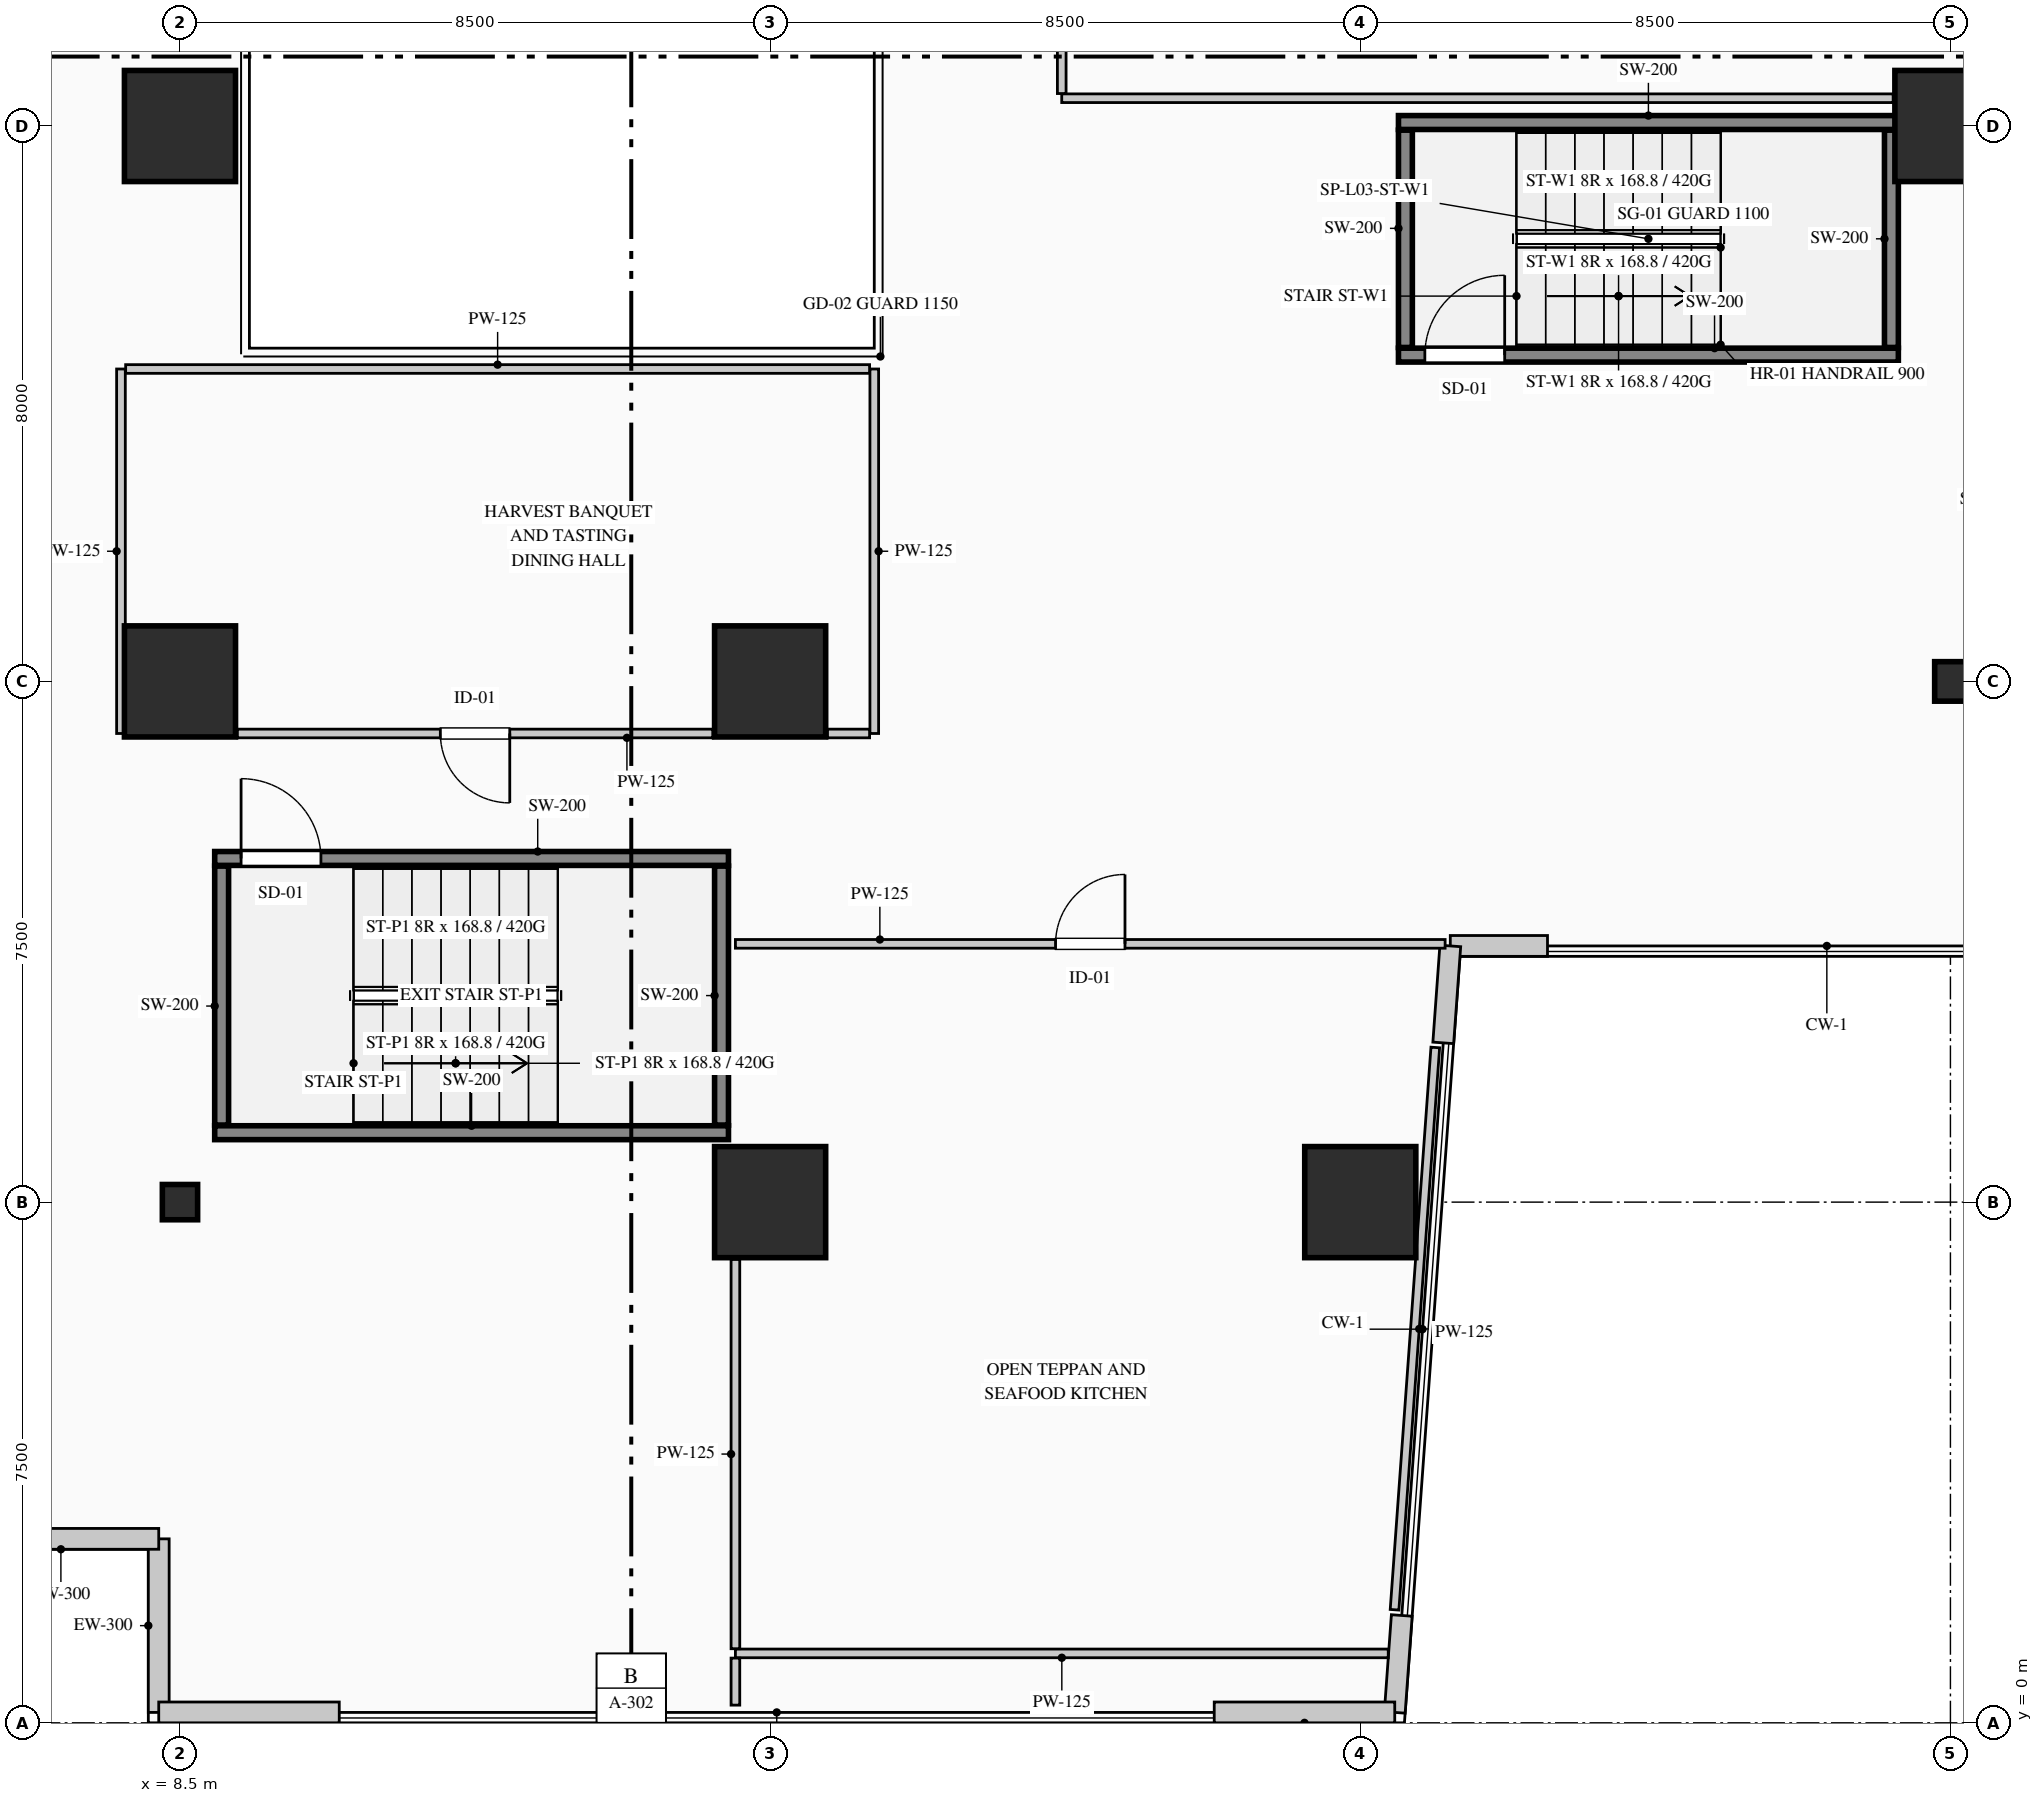
"""IFC4 building model, lengths in metres.
Left out: names, types, materials, properties, quantities, classifications, styles, units other than length and angle.
Written with IfcOpenShell. Run it as: python <this file> out.ifc"""

import sys

from ifc_helpers import new_model, si_unit, direction, frame, frame_2d, origin, origin_2d, place, context, subcontext, project, spatial, rectangle, hollow_circle, i_section, extrude, element, fill, save


model = new_model("IFC4")
c1 = context("Model", 3, precision=1e-05, world=origin(), true_north=direction((0.0, 1.0)))
c2 = subcontext(c1, "Body", "Model", "MODEL_VIEW")
j1 = project(units=[si_unit("LENGTHUNIT", "METRE"), si_unit("PLANEANGLEUNIT", "RADIAN")], contexts=[c1])
p1 = place(None, origin())
s1 = spatial("IfcSite", under=j1, at=p1, CompositionType="ELEMENT")
p2 = place(p1, origin())
s2 = spatial("IfcBuilding", under=s1, at=p2, CompositionType="ELEMENT")
p3 = place(p2, frame((0.0, 0.0, 10.8)))
s3 = spatial("IfcBuildingStorey", under=s2, at=p3, CompositionType="ELEMENT", Elevation=10.8)
p4 = place(p3, frame((26.05, 19.7, 0.0), z_axis=(0.0, 0.0, 1.0), x_axis=(1.0, 0.0, 0.0)))
e1 = element("IfcWall", 1, at=p4, inside=s3, PredefinedType="SHEAR", context=c2, shape_type="SweptSolid", body=[
    extrude(rectangle(XDim=7.2, YDim=0.2, at=frame_2d((3.6, 0.0))), origin(), (0.0, 0.0, 1.0), 5.4),
])
p5 = place(p4, frame((0.38, 0.0, 0.0)))
e2 = element("IfcOpeningElement", 2, at=p5, cuts=e1, PredefinedType="OPENING", context=c2, shape_type="SweptSolid", body=[
    extrude(rectangle(XDim=1.15, YDim=2.2, at=frame_2d((0.575, 1.1))), frame((0.0, 0.11, 0.0), z_axis=(0.0, -1.0, 0.0), x_axis=(1.0, 0.0, 0.0)), (0.0, 0.0, 1.0), 0.22),
])
p6 = place(p3, frame((26.05, 23.05, 0.0), z_axis=(0.0, 0.0, 1.0), x_axis=(1.0, 0.0, 0.0)))
e3 = element("IfcWall", 3, at=p6, inside=s3, PredefinedType="SHEAR", context=c2, shape_type="SweptSolid", body=[
    extrude(rectangle(XDim=7.2, YDim=0.2, at=frame_2d((3.6, 0.0))), origin(), (0.0, 0.0, 1.0), 5.4),
])
for number, where, z_axis, x_axis in (
    (4, (26.15, 19.81, 0.0), (0.0, 0.0, 1.0), (0.0, 1.0, 0.0)),
    (5, (33.15, 19.81, 0.0), (0.0, 0.0, 1.0), (0.0, 1.0, 0.0)),
):
    element("IfcWall", number, at=place(p3, frame(where, z_axis=z_axis, x_axis=x_axis)), inside=s3, PredefinedType="SHEAR", context=c2, shape_type="SweptSolid", body=[
        extrude(rectangle(XDim=3.13, YDim=0.2, at=frame_2d((1.565, 0.0))), origin(), (0.0, 0.0, 1.0), 5.4),
    ])
p7 = place(p3, frame((9.0, 8.5, 0.0), z_axis=(0.0, 0.0, 1.0), x_axis=(1.0, 0.0, 0.0)))
e6 = element("IfcWall", 6, at=p7, inside=s3, PredefinedType="SHEAR", context=c2, shape_type="SweptSolid", body=[
    extrude(rectangle(XDim=7.4, YDim=0.2, at=frame_2d((3.7, 0.0))), origin(), (0.0, 0.0, 1.0), 5.4),
])
p8 = place(p3, frame((9.0, 12.45, 0.0), z_axis=(0.0, 0.0, 1.0), x_axis=(1.0, 0.0, 0.0)))
e7 = element("IfcWall", 7, at=p8, inside=s3, PredefinedType="SHEAR", context=c2, shape_type="SweptSolid", body=[
    extrude(rectangle(XDim=7.4, YDim=0.2, at=frame_2d((3.7, 0.0))), origin(), (0.0, 0.0, 1.0), 5.4),
])
p9 = place(p8, frame((0.38, 0.0, 0.0)))
e8 = element("IfcOpeningElement", 8, at=p9, cuts=e7, PredefinedType="OPENING", context=c2, shape_type="SweptSolid", body=[
    extrude(rectangle(XDim=1.15, YDim=2.2, at=frame_2d((0.575, 1.1))), frame((0.0, 0.11, 0.0), z_axis=(0.0, -1.0, 0.0), x_axis=(1.0, 0.0, 0.0)), (0.0, 0.0, 1.0), 0.22),
])
for number, where, z_axis, x_axis in (
    (9, (9.1, 8.61, 0.0), (0.0, 0.0, 1.0), (0.0, 1.0, 0.0)),
    (10, (16.3, 8.61, 0.0), (0.0, 0.0, 1.0), (0.0, 1.0, 0.0)),
):
    element("IfcWall", number, at=place(p3, frame(where, z_axis=z_axis, x_axis=x_axis)), inside=s3, PredefinedType="SHEAR", context=c2, shape_type="SweptSolid", body=[
        extrude(rectangle(XDim=3.73, YDim=0.2, at=frame_2d((1.865, 0.0))), origin(), (0.0, 0.0, 1.0), 5.4),
    ])
p10 = place(p3, frame((8.5, 7.5, 0.0), z_axis=(0.0, 0.0, 1.0), x_axis=(1.0, 0.0, 0.0)))
e11 = element("IfcColumn", 11, at=p10, inside=s3, PredefinedType="COLUMN", context=c2, shape_type="SweptSolid", body=[
    extrude(hollow_circle(Radius=0.254, WallThickness=0.025, at=origin_2d()), origin(), (0.0, 0.0, 1.0), 5.4),
])
for number, where, z_axis, x_axis in (
    (12, (8.5, 15.0, 0.0), (0.0, 0.0, 1.0), (1.0, 0.0, 0.0)),
    (13, (8.5, 23.0, 0.0), (0.0, 0.0, 1.0), (1.0, 0.0, 0.0)),
    (14, (17.0, 7.5, 0.0), (0.0, 0.0, 1.0), (1.0, 0.0, 0.0)),
    (15, (17.0, 15.0, 0.0), (0.0, 0.0, 1.0), (1.0, 0.0, 0.0)),
    (16, (25.5, 7.5, 0.0), (0.0, 0.0, 1.0), (1.0, 0.0, 0.0)),
):
    element("IfcColumn", number, at=place(p3, frame(where, z_axis=z_axis, x_axis=x_axis)), inside=s3, PredefinedType="COLUMN", context=c2, shape_type="SweptSolid", body=[
        extrude(rectangle(XDim=1.6, YDim=1.6, at=origin_2d()), origin(), (0.0, 0.0, 1.0), 5.4),
    ])
p11 = place(p3, frame((34.0, 15.0, 0.0), z_axis=(0.0, 0.0, 1.0), x_axis=(1.0, 0.0, 0.0)))
e17 = element("IfcColumn", 17, at=p11, inside=s3, PredefinedType="COLUMN", context=c2, shape_type="SweptSolid", body=[
    extrude(i_section(OverallWidth=0.454, OverallDepth=0.569, WebThickness=0.078, FlangeThickness=0.08, FilletRadius=0.015, at=origin_2d()), origin(), (0.0, 0.0, 1.0), 5.4),
])
p12 = place(p3, frame((34.0, 23.0, 0.0), z_axis=(0.0, 0.0, 1.0), x_axis=(1.0, 0.0, 0.0)))
e18 = element("IfcColumn", 18, at=p12, inside=s3, PredefinedType="COLUMN", context=c2, shape_type="SweptSolid", body=[
    extrude(rectangle(XDim=1.6, YDim=1.6, at=origin_2d()), origin(), (0.0, 0.0, 1.0), 5.4),
])
p13 = place(p3, frame((8.194, 0.15, 0.0), z_axis=(0.0, 0.0, 1.0), x_axis=(0.0, 1.0, 0.0)))
e19 = element("IfcWall", 19, at=p13, inside=s3, PredefinedType="STANDARD", context=c2, shape_type="SweptSolid", body=[
    extrude(rectangle(XDim=2.5, YDim=0.3, at=frame_2d((1.25, 0.0))), origin(), (0.0, 0.0, 1.0), 5.08),
])
p14 = place(p3, frame((8.194, 2.65, 0.0), z_axis=(0.0, 0.0, 1.0), x_axis=(-1.0, 0.0, 0.0)))
e20 = element("IfcWall", 20, at=p14, inside=s3, PredefinedType="STANDARD", context=c2, shape_type="SweptSolid", body=[
    extrude(rectangle(XDim=2.818, YDim=0.3, at=frame_2d((1.409, 0.0))), origin(), (0.0, 0.0, 1.0), 5.08),
])
p15 = place(p3, frame((28.197, 11.19, 0.0), z_axis=(0.0, 0.0, 1.0), x_axis=(-1.0, 0.0, 0.0)))
e21 = element("IfcWall", 21, at=p15, inside=s3, PredefinedType="STANDARD", context=c2, shape_type="SweptSolid", body=[
    extrude(rectangle(XDim=1.4, YDim=0.3, at=frame_2d((0.7, 0.0))), origin(), (0.0, 0.0, 1.0), 5.08),
])
p16 = place(p3, frame((26.796, 11.19, 0.0), z_axis=(0.0, 0.0, 1.0), x_axis=(-0.072201344972, -0.997390077043, 0.0)))
e22 = element("IfcWall", 22, at=p16, inside=s3, PredefinedType="STANDARD", context=c2, shape_type="SweptSolid", body=[
    extrude(rectangle(XDim=1.4, YDim=0.3, at=frame_2d((0.7, 0.0))), origin(), (0.0, 0.0, 1.0), 5.08),
])
p17 = place(p3, frame((26.098, 1.546, 0.0), z_axis=(0.0, 0.0, 1.0), x_axis=(-0.072188788144, -0.997390985956, 0.0)))
e23 = element("IfcWall", 23, at=p17, inside=s3, PredefinedType="STANDARD", context=c2, shape_type="SweptSolid", body=[
    extrude(rectangle(XDim=1.4, YDim=0.3, at=frame_2d((0.7, 0.0))), origin(), (0.0, 0.0, 1.0), 5.08),
])
p18 = place(p3, frame((25.997, 0.15, 0.0), z_axis=(0.0, 0.0, 1.0), x_axis=(-1.0, 0.0, 0.0)))
e24 = element("IfcWall", 24, at=p18, inside=s3, PredefinedType="STANDARD", context=c2, shape_type="SweptSolid", body=[
    extrude(rectangle(XDim=2.6, YDim=0.3, at=frame_2d((1.3, 0.0))), origin(), (0.0, 0.0, 1.0), 5.08),
])
p19 = place(p3, frame((10.794, 0.15, 0.0), z_axis=(0.0, 0.0, 1.0), x_axis=(-1.0, 0.0, 0.0)))
e25 = element("IfcWall", 25, at=p19, inside=s3, PredefinedType="STANDARD", context=c2, shape_type="SweptSolid", body=[
    extrude(rectangle(XDim=2.6, YDim=0.3, at=frame_2d((1.3, 0.0))), origin(), (0.0, 0.0, 1.0), 5.08),
])
p20 = place(p3, frame((18.5, 19.5, 0.0), z_axis=(0.0, 0.0, 1.0), x_axis=(0.0, -1.0, 0.0)))
e26 = element("IfcWall", 26, at=p20, inside=s3, PredefinedType="PARTITIONING", context=c2, shape_type="SweptSolid", body=[
    extrude(rectangle(XDim=5.25, YDim=0.125, at=frame_2d((2.625, 0.0))), origin(), (0.0, 0.0, 1.0), 4.465),
])
p21 = place(p3, frame((18.433, 14.25, 0.0), z_axis=(0.0, 0.0, 1.0), x_axis=(-1.0, 0.0, 0.0)))
e27 = element("IfcWall", 27, at=p21, inside=s3, PredefinedType="PARTITIONING", context=c2, shape_type="SweptSolid", body=[
    extrude(rectangle(XDim=0.608, YDim=0.125, at=frame_2d((0.304, 0.0))), origin(), (0.0, 0.0, 1.0), 5.08),
])
p22 = place(p3, frame((16.175, 14.25, 0.0), z_axis=(0.0, 0.0, 1.0), x_axis=(-1.0, 0.0, 0.0)))
e28 = element("IfcWall", 28, at=p22, inside=s3, PredefinedType="PARTITIONING", context=c2, shape_type="SweptSolid", body=[
    extrude(rectangle(XDim=6.85, YDim=0.125, at=frame_2d((3.425, 0.0))), origin(), (0.0, 0.0, 1.0), 5.08),
])
p23 = place(p22, frame((2.925, 0.0, 0.0)))
e29 = element("IfcOpeningElement", 29, at=p23, cuts=e28, PredefinedType="OPENING", context=c2, shape_type="SweptSolid", body=[
    extrude(rectangle(XDim=1.0, YDim=2.15, at=frame_2d((0.5, 1.075))), frame((0.0, 0.073, 0.0), z_axis=(0.0, -1.0, 0.0), x_axis=(1.0, 0.0, 0.0)), (0.0, 0.0, 1.0), 0.145),
])
p24 = place(p3, frame((7.65, 14.25, 0.0), z_axis=(0.0, 0.0, 1.0), x_axis=(0.0, 1.0, 0.0)))
e30 = element("IfcWall", 30, at=p24, inside=s3, PredefinedType="PARTITIONING", context=c2, shape_type="SweptSolid", body=[
    extrude(rectangle(XDim=5.25, YDim=0.125, at=frame_2d((2.625, 0.0))), origin(), (0.0, 0.0, 1.0), 5.08),
])
p25 = place(p3, frame((7.718, 19.5, 0.0), z_axis=(0.0, 0.0, 1.0), x_axis=(1.0, 0.0, 0.0)))
e31 = element("IfcWall", 31, at=p25, inside=s3, PredefinedType="PARTITIONING", context=c2, shape_type="SweptSolid", body=[
    extrude(rectangle(XDim=10.715, YDim=0.125, at=frame_2d((5.357, 0.0))), origin(), (0.0, 0.0, 1.0), 5.08),
])
p26 = place(p3, frame((26.581, 9.727, 0.0), z_axis=(0.0, 0.0, 1.0), x_axis=(-0.072281196228, -0.997384293375, 0.0)))
e32 = element("IfcWall", 32, at=p26, inside=s3, PredefinedType="PARTITIONING", context=c2, shape_type="SweptSolid", body=[
    extrude(rectangle(XDim=8.12, YDim=0.125, at=frame_2d((4.06, 0.0))), origin(), (0.0, 0.0, 1.0), 5.08),
])
p27 = place(p3, frame((25.903, 1.0, 0.0), z_axis=(0.0, 0.0, 1.0), x_axis=(-1.0, 0.0, 0.0)))
e33 = element("IfcWall", 33, at=p27, inside=s3, PredefinedType="PARTITIONING", context=c2, shape_type="SweptSolid", body=[
    extrude(rectangle(XDim=9.403, YDim=0.125, at=frame_2d((4.701, 0.0))), origin(), (0.0, 0.0, 1.0), 5.08),
])
p28 = place(p3, frame((16.5, 0.255, 0.0), z_axis=(0.0, 0.0, 1.0), x_axis=(0.0, 1.0, 0.0)))
e34 = element("IfcWall", 34, at=p28, inside=s3, PredefinedType="PARTITIONING", context=c2, shape_type="SweptSolid", body=[
    extrude(rectangle(XDim=0.678, YDim=0.125, at=frame_2d((0.339, 0.0))), origin(), (0.0, 0.0, 1.0), 5.08),
])
p29 = place(p3, frame((16.5, 1.067, 0.0), z_axis=(0.0, 0.0, 1.0), x_axis=(0.0, 1.0, 0.0)))
e35 = element("IfcWall", 35, at=p29, inside=s3, PredefinedType="PARTITIONING", context=c2, shape_type="SweptSolid", body=[
    extrude(rectangle(XDim=5.608, YDim=0.125, at=frame_2d((2.804, 0.0))), origin(), (0.0, 0.0, 1.0), 5.08),
])
p30 = place(p3, frame((16.5, 11.22, 0.0), z_axis=(0.0, 0.0, 1.0), x_axis=(1.0, 0.0, 0.0)))
e36 = element("IfcWall", 36, at=p30, inside=s3, PredefinedType="PARTITIONING", context=c2, shape_type="SweptSolid", body=[
    extrude(rectangle(XDim=10.222, YDim=0.125, at=frame_2d((5.111, 0.0))), origin(), (0.0, 0.0, 1.0), 5.08),
])
p31 = place(p30, frame((4.611, 0.0, 0.0)))
e37 = element("IfcOpeningElement", 37, at=p31, cuts=e36, PredefinedType="OPENING", context=c2, shape_type="SweptSolid", body=[
    extrude(rectangle(XDim=1.0, YDim=2.15, at=frame_2d((0.5, 1.075))), frame((0.0, 0.073, 0.0), z_axis=(0.0, -1.0, 0.0), x_axis=(1.0, 0.0, 0.0)), (0.0, 0.0, 1.0), 0.145),
])
p32 = place(p3, frame((33.175, 23.4, 0.0), z_axis=(0.0, 0.0, 1.0), x_axis=(-1.0, 0.0, 0.0)))
e38 = element("IfcWall", 38, at=p32, inside=s3, PredefinedType="PARTITIONING", context=c2, shape_type="SweptSolid", body=[
    extrude(rectangle(XDim=11.975, YDim=0.125, at=frame_2d((5.988, 0.0))), origin(), (0.0, 0.0, 1.0), 5.08),
])
p33 = place(p3, frame((21.2, 23.468, 0.0), z_axis=(0.0, 0.0, 1.0), x_axis=(0.0, 1.0, 0.0)))
e39 = element("IfcWall", 39, at=p33, inside=s3, PredefinedType="PARTITIONING", context=c2, shape_type="SweptSolid", body=[
    extrude(rectangle(XDim=5.032, YDim=0.125, at=frame_2d((2.516, 0.0))), origin(), (0.0, 0.0, 1.0), 5.08),
])
p34 = place(p5, origin())
e40 = element("IfcDoor", 40, at=p34, inside=s3, OperationType="SINGLE_SWING_RIGHT", PredefinedType="DOOR", context=c2, shape_type="SweptSolid", body=[
    extrude(rectangle(XDim=1.15, YDim=2.2, at=frame_2d((0.575, 1.1))), frame((0.0, 0.025, 0.0), z_axis=(0.0, -1.0, 0.0), x_axis=(1.0, 0.0, 0.0)), (0.0, 0.0, 1.0), 0.05),
])
fill(e2, e40)
p35 = place(p9, origin())
e41 = element("IfcDoor", 41, at=p35, inside=s3, OperationType="SINGLE_SWING_LEFT", PredefinedType="DOOR", context=c2, shape_type="SweptSolid", body=[
    extrude(rectangle(XDim=1.15, YDim=2.2, at=frame_2d((0.575, 1.1))), frame((0.0, 0.025, 0.0), z_axis=(0.0, -1.0, 0.0), x_axis=(1.0, 0.0, 0.0)), (0.0, 0.0, 1.0), 0.05),
])
fill(e8, e41)
p36 = place(p23, origin())
e42 = element("IfcDoor", 42, at=p36, inside=s3, OperationType="SINGLE_SWING_LEFT", PredefinedType="DOOR", context=c2, shape_type="SweptSolid", body=[
    extrude(rectangle(XDim=1.0, YDim=2.15, at=frame_2d((0.5, 1.075))), frame((0.0, 0.025, 0.0), z_axis=(0.0, -1.0, 0.0), x_axis=(1.0, 0.0, 0.0)), (0.0, 0.0, 1.0), 0.05),
])
fill(e29, e42)
p37 = place(p31, origin())
e43 = element("IfcDoor", 43, at=p37, inside=s3, OperationType="SINGLE_SWING_RIGHT", PredefinedType="DOOR", context=c2, shape_type="SweptSolid", body=[
    extrude(rectangle(XDim=1.0, YDim=2.15, at=frame_2d((0.5, 1.075))), frame((0.0, 0.025, 0.0), z_axis=(0.0, -1.0, 0.0), x_axis=(1.0, 0.0, 0.0)), (0.0, 0.0, 1.0), 0.05),
])
fill(e37, e43)
save(model, sys.argv[1])
